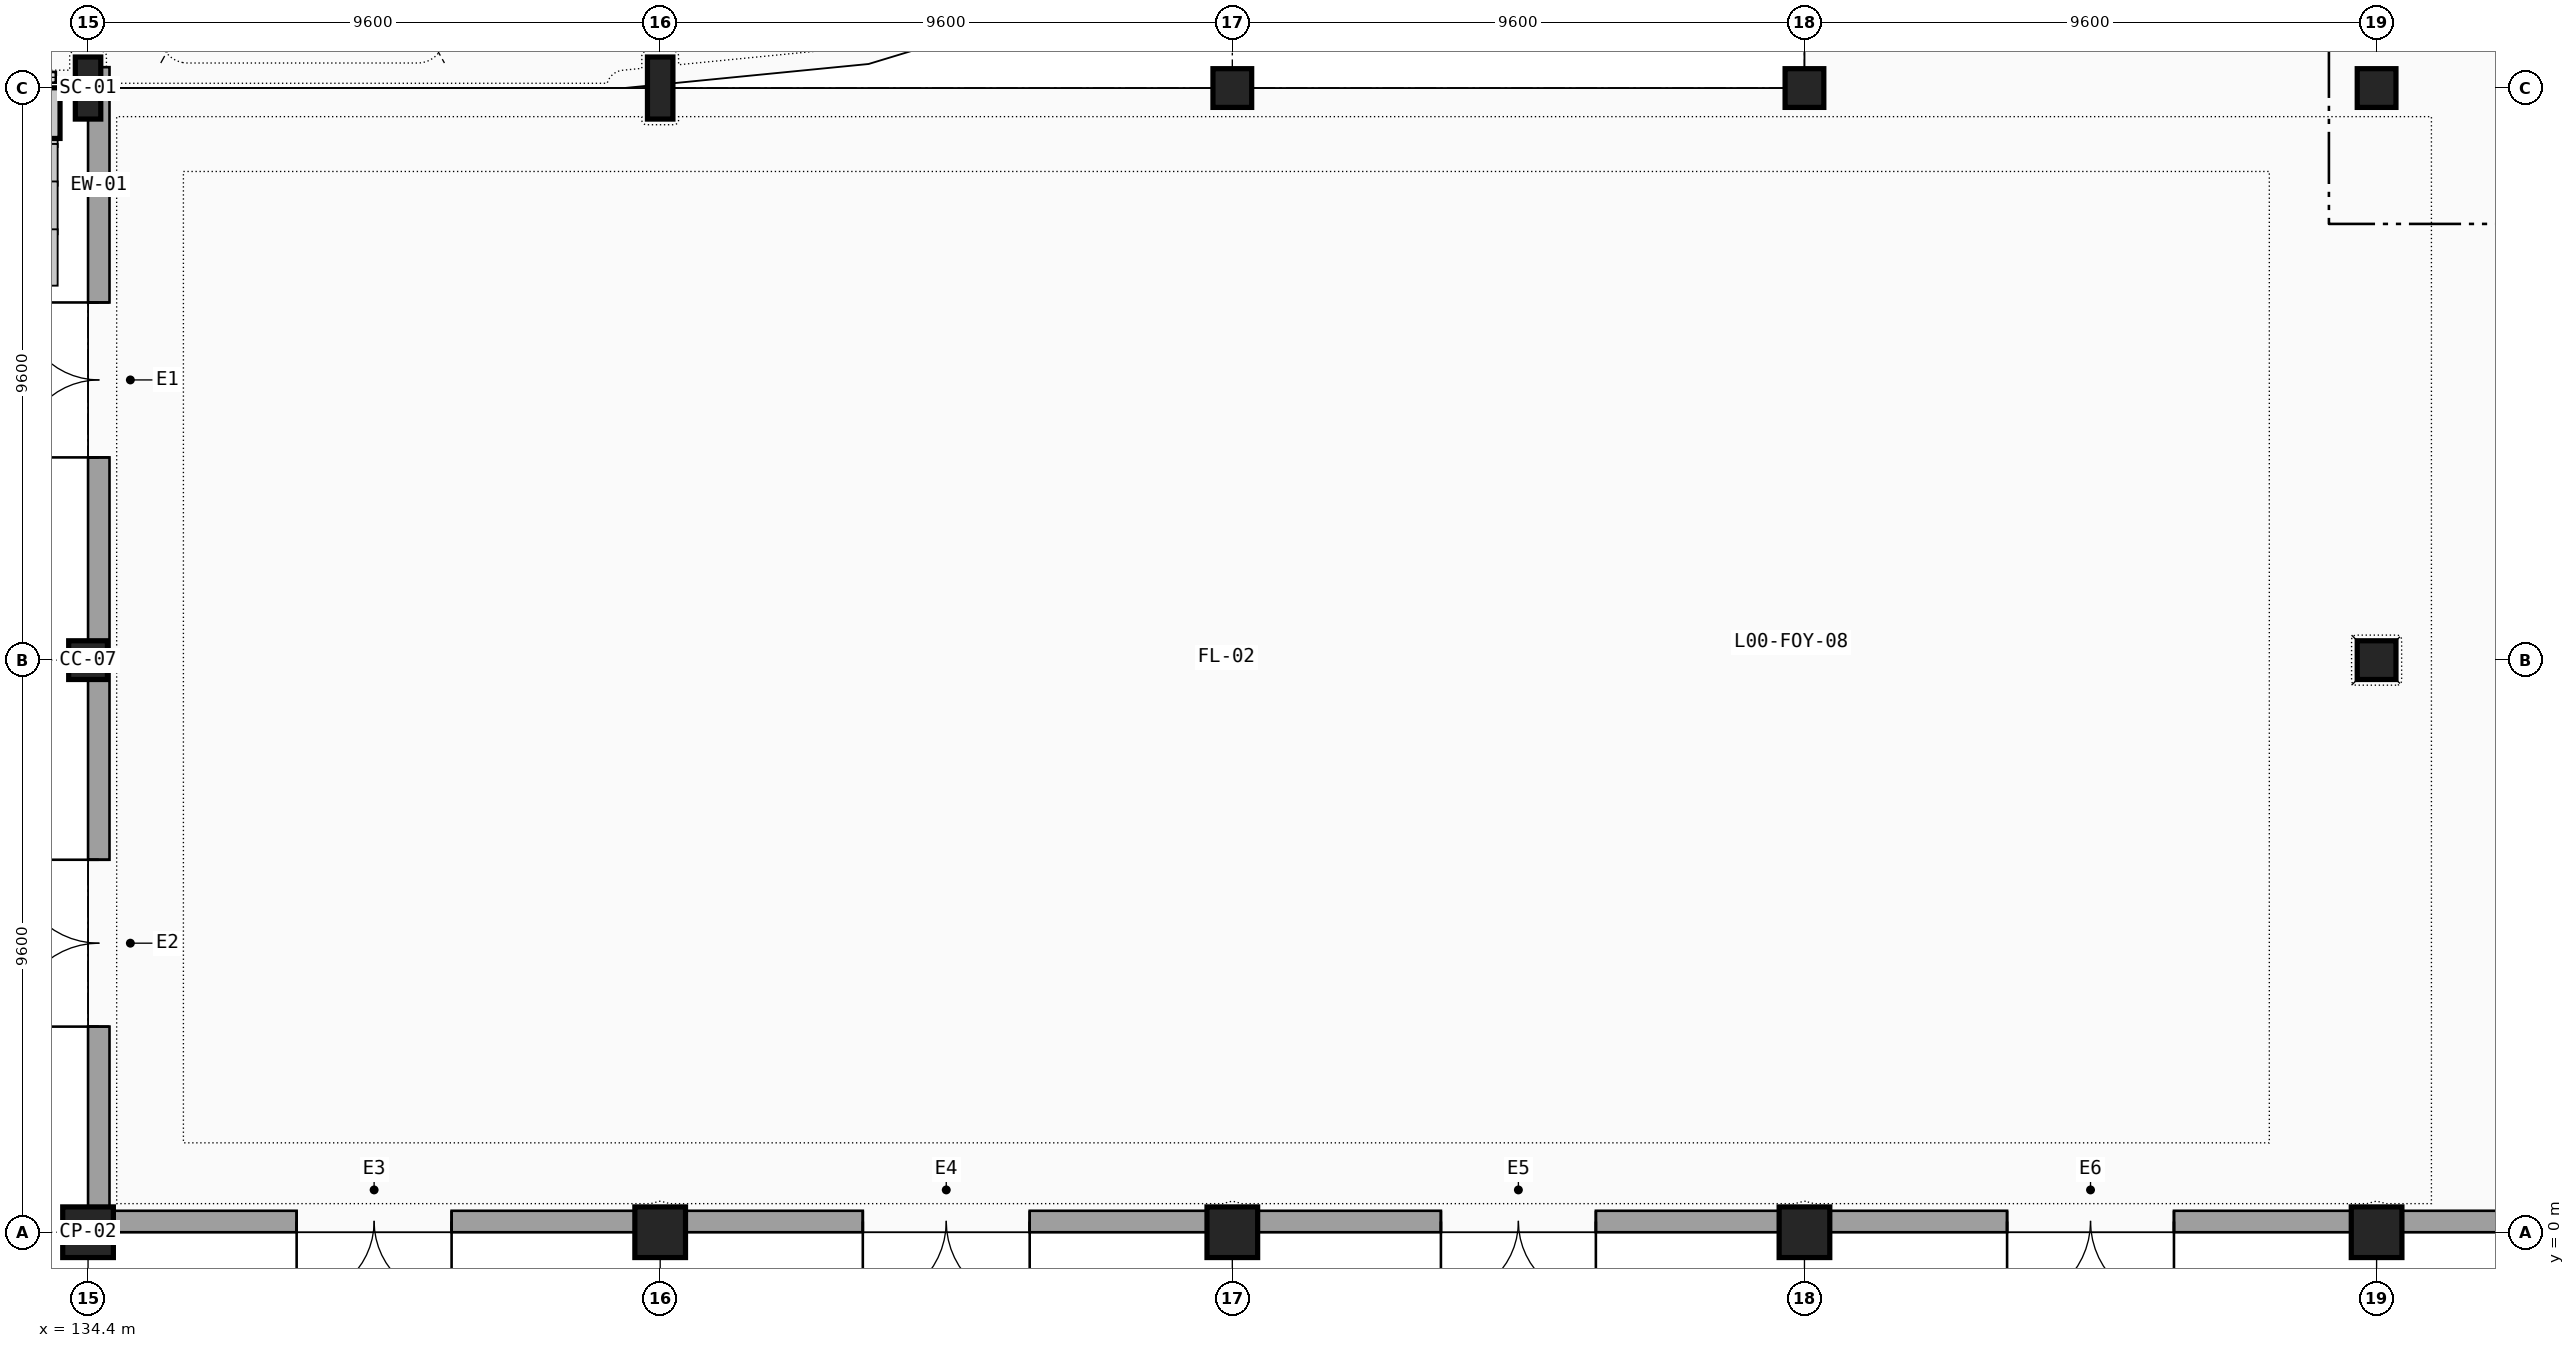
"""IFC4 building model, lengths in metres.
Left out: names, types, materials, properties, quantities, classifications, styles, units other than length and angle.
Written with IfcOpenShell. Run it as: python <this file> out.ifc"""

import sys

from ifc_helpers import new_model, si_unit, direction, frame, frame_2d, origin, origin_2d, place, context, subcontext, project, spatial, rectangle, circle, i_section, extrude, element, fill, save


model = new_model("IFC4")
c1 = context("Model", 3, precision=1e-05, world=origin(), true_north=direction((0.0, 1.0)))
c2 = subcontext(c1, "Body", "Model", "MODEL_VIEW")
j1 = project(units=[si_unit("LENGTHUNIT", "METRE"), si_unit("PLANEANGLEUNIT", "RADIAN")], contexts=[c1])
p1 = place(None, origin())
s1 = spatial("IfcSite", under=j1, at=p1, CompositionType="ELEMENT")
p2 = place(p1, origin())
s2 = spatial("IfcBuilding", under=s1, at=p2, CompositionType="ELEMENT")
p3 = place(p2, origin())
s3 = spatial("IfcBuildingStorey", under=s2, at=p3, CompositionType="ELEMENT", Elevation=0.0)
p4 = place(p3, frame((134.4, 0.0, 0.0), z_axis=(0.0, 0.0, 1.0), x_axis=(1.0, 0.0, 0.0)))
e1 = element("IfcColumn", 1, at=p4, inside=s3, PredefinedType="PILASTER", context=c2, shape_type="SweptSolid", body=[
    extrude(circle(Radius=0.425, at=origin_2d()), origin(), (0.0, 0.0, 1.0), 4.8),
])
p5 = place(p3, frame((134.4, 9.6, 0.0), z_axis=(0.0, 0.0, 1.0), x_axis=(1.0, 0.0, 0.0)))
e2 = element("IfcColumn", 2, at=p5, inside=s3, PredefinedType="COLUMN", context=c2, shape_type="SweptSolid", body=[
    extrude(rectangle(XDim=0.65, YDim=0.65, at=origin_2d()), origin(), (0.0, 0.0, 1.0), 4.8),
])
p6 = place(p3, frame((134.4, 19.2, 0.0), z_axis=(0.0, 0.0, 1.0), x_axis=(1.0, 0.0, 0.0)))
e3 = element("IfcColumn", 3, at=p6, inside=s3, PredefinedType="COLUMN", context=c2, shape_type="SweptSolid", body=[
    extrude(i_section(OverallWidth=0.427, OverallDepth=1.042, WebThickness=0.031, FlangeThickness=0.056, FilletRadius=0.031, at=origin_2d()), origin(), (0.0, 0.0, 1.0), 4.8),
])
p7 = place(p3, frame((144.0, 0.0, 0.0), z_axis=(0.0, 0.0, 1.0), x_axis=(1.0, 0.0, 0.0)))
e4 = element("IfcColumn", 4, at=p7, inside=s3, PredefinedType="PILASTER", context=c2, shape_type="SweptSolid", body=[
    extrude(circle(Radius=0.425, at=origin_2d()), origin(), (0.0, 0.0, 1.0), 4.8),
])
p8 = place(p3, frame((144.0, 19.2, 0.0), z_axis=(0.0, 0.0, 1.0), x_axis=(1.0, 0.0, 0.0)))
e5 = element("IfcColumn", 5, at=p8, inside=s3, PredefinedType="COLUMN", context=c2, shape_type="SweptSolid", body=[
    extrude(i_section(OverallWidth=0.427, OverallDepth=1.042, WebThickness=0.031, FlangeThickness=0.056, FilletRadius=0.031, at=origin_2d()), origin(), (0.0, 0.0, 1.0), 4.8),
])
p9 = place(p3, frame((153.6, 0.0, 0.0), z_axis=(0.0, 0.0, 1.0), x_axis=(1.0, 0.0, 0.0)))
e6 = element("IfcColumn", 6, at=p9, inside=s3, PredefinedType="PILASTER", context=c2, shape_type="SweptSolid", body=[
    extrude(circle(Radius=0.425, at=origin_2d()), origin(), (0.0, 0.0, 1.0), 4.8),
])
p10 = place(p3, frame((153.6, 19.2, 0.0), z_axis=(0.0, 0.0, 1.0), x_axis=(1.0, 0.0, 0.0)))
e7 = element("IfcColumn", 7, at=p10, inside=s3, PredefinedType="COLUMN", context=c2, shape_type="SweptSolid", body=[
    extrude(rectangle(XDim=0.65, YDim=0.65, at=origin_2d()), origin(), (0.0, 0.0, 1.0), 4.8),
])
p11 = place(p3, frame((163.2, 0.0, 0.0), z_axis=(0.0, 0.0, 1.0), x_axis=(1.0, 0.0, 0.0)))
e8 = element("IfcColumn", 8, at=p11, inside=s3, PredefinedType="PILASTER", context=c2, shape_type="SweptSolid", body=[
    extrude(circle(Radius=0.425, at=origin_2d()), origin(), (0.0, 0.0, 1.0), 4.8),
])
p12 = place(p3, frame((163.2, 19.2, 0.0), z_axis=(0.0, 0.0, 1.0), x_axis=(1.0, 0.0, 0.0)))
e9 = element("IfcColumn", 9, at=p12, inside=s3, PredefinedType="COLUMN", context=c2, shape_type="SweptSolid", body=[
    extrude(rectangle(XDim=0.65, YDim=0.65, at=origin_2d()), origin(), (0.0, 0.0, 1.0), 4.8),
])
p13 = place(p3, frame((172.8, 0.0, 0.0), z_axis=(0.0, 0.0, 1.0), x_axis=(1.0, 0.0, 0.0)))
e10 = element("IfcColumn", 10, at=p13, inside=s3, PredefinedType="PILASTER", context=c2, shape_type="SweptSolid", body=[
    extrude(circle(Radius=0.425, at=origin_2d()), origin(), (0.0, 0.0, 1.0), 4.8),
])
for number, where, z_axis, x_axis in (
    (11, (172.8, 9.6, 0.0), (0.0, 0.0, 1.0), (1.0, 0.0, 0.0)),
    (12, (172.8, 19.2, 0.0), (0.0, 0.0, 1.0), (1.0, 0.0, 0.0)),
):
    element("IfcColumn", number, at=place(p3, frame(where, z_axis=z_axis, x_axis=x_axis)), inside=s3, PredefinedType="COLUMN", context=c2, shape_type="SweptSolid", body=[
        extrude(rectangle(XDim=0.65, YDim=0.65, at=origin_2d()), origin(), (0.0, 0.0, 1.0), 4.8),
    ])
p14 = place(p3, frame((134.58, 19.55, 0.0), z_axis=(0.0, 0.0, 1.0), x_axis=(0.0, -1.0, 0.0)))
e13 = element("IfcWall", 13, at=p14, inside=s3, PredefinedType="SOLIDWALL", context=c2, shape_type="SweptSolid", body=[
    extrude(rectangle(XDim=9.95, YDim=0.36, at=frame_2d((4.975, 0.0))), origin(), (0.0, 0.0, 1.0), 3.573),
])
p15 = place(p14, frame((6.548, 0.0, 0.0), z_axis=(0.0, 0.0, 1.0), x_axis=(-1.0, 0.0, 0.0)))
e14 = element("IfcOpeningElement", 14, at=p15, cuts=e13, PredefinedType="OPENING", context=c2, shape_type="SweptSolid", body=[
    extrude(rectangle(XDim=2.6, YDim=2.6, at=frame_2d((1.3, 1.3))), frame((0.0, 0.19, 0.0), z_axis=(0.0, -1.0, 0.0), x_axis=(1.0, 0.0, 0.0)), (0.0, 0.0, 1.0), 0.38),
])
p16 = place(p3, frame((134.58, 9.6, 0.0), z_axis=(0.0, 0.0, 1.0), x_axis=(0.0, -1.0, 0.0)))
e15 = element("IfcWall", 15, at=p16, inside=s3, PredefinedType="SOLIDWALL", context=c2, shape_type="SweptSolid", body=[
    extrude(rectangle(XDim=9.195, YDim=0.36, at=frame_2d((4.598, 0.0))), origin(), (0.0, 0.0, 1.0), 3.7),
])
p17 = place(p16, frame((6.15, 0.0, 0.0), z_axis=(0.0, 0.0, 1.0), x_axis=(-1.0, 0.0, 0.0)))
e16 = element("IfcOpeningElement", 16, at=p17, cuts=e15, PredefinedType="OPENING", context=c2, shape_type="SweptSolid", body=[
    extrude(rectangle(XDim=2.8, YDim=2.6, at=frame_2d((1.4, 1.3))), frame((0.0, 0.19, 0.0), z_axis=(0.0, -1.0, 0.0), x_axis=(1.0, 0.0, 0.0)), (0.0, 0.0, 1.0), 0.38),
])
p18 = place(p3, frame((134.805, 0.18, 0.0), z_axis=(0.0, 0.0, 1.0), x_axis=(1.0, 0.0, 0.0)))
e17 = element("IfcWall", 17, at=p18, inside=s3, PredefinedType="SOLIDWALL", context=c2, shape_type="SweptSolid", body=[
    extrude(rectangle(XDim=8.79, YDim=0.36, at=frame_2d((4.395, 0.0))), origin(), (0.0, 0.0, 1.0), 3.573),
])
p19 = place(p18, frame((5.695, 0.0, 0.0), z_axis=(0.0, 0.0, 1.0), x_axis=(-1.0, 0.0, 0.0)))
e18 = element("IfcOpeningElement", 18, at=p19, cuts=e17, PredefinedType="OPENING", context=c2, shape_type="SweptSolid", body=[
    extrude(rectangle(XDim=2.6, YDim=2.6, at=frame_2d((1.3, 1.3))), frame((0.0, 0.19, 0.0), z_axis=(0.0, -1.0, 0.0), x_axis=(1.0, 0.0, 0.0)), (0.0, 0.0, 1.0), 0.38),
])
p20 = place(p3, frame((144.405, 0.18, 0.0), z_axis=(0.0, 0.0, 1.0), x_axis=(1.0, 0.0, 0.0)))
e19 = element("IfcWall", 19, at=p20, inside=s3, PredefinedType="SOLIDWALL", context=c2, shape_type="SweptSolid", body=[
    extrude(rectangle(XDim=8.79, YDim=0.36, at=frame_2d((4.395, 0.0))), origin(), (0.0, 0.0, 1.0), 3.573),
])
p21 = place(p20, frame((5.795, 0.0, 0.0), z_axis=(0.0, 0.0, 1.0), x_axis=(-1.0, 0.0, 0.0)))
e20 = element("IfcOpeningElement", 20, at=p21, cuts=e19, PredefinedType="OPENING", context=c2, shape_type="SweptSolid", body=[
    extrude(rectangle(XDim=2.8, YDim=2.6, at=frame_2d((1.4, 1.3))), frame((0.0, 0.19, 0.0), z_axis=(0.0, -1.0, 0.0), x_axis=(1.0, 0.0, 0.0)), (0.0, 0.0, 1.0), 0.38),
])
p22 = place(p3, frame((154.005, 0.18, 0.0), z_axis=(0.0, 0.0, 1.0), x_axis=(1.0, 0.0, 0.0)))
e21 = element("IfcWall", 21, at=p22, inside=s3, PredefinedType="SOLIDWALL", context=c2, shape_type="SweptSolid", body=[
    extrude(rectangle(XDim=8.79, YDim=0.36, at=frame_2d((4.395, 0.0))), origin(), (0.0, 0.0, 1.0), 3.573),
])
p23 = place(p22, frame((5.695, 0.0, 0.0), z_axis=(0.0, 0.0, 1.0), x_axis=(-1.0, 0.0, 0.0)))
e22 = element("IfcOpeningElement", 22, at=p23, cuts=e21, PredefinedType="OPENING", context=c2, shape_type="SweptSolid", body=[
    extrude(rectangle(XDim=2.6, YDim=2.6, at=frame_2d((1.3, 1.3))), frame((0.0, 0.19, 0.0), z_axis=(0.0, -1.0, 0.0), x_axis=(1.0, 0.0, 0.0)), (0.0, 0.0, 1.0), 0.38),
])
p24 = place(p3, frame((163.605, 0.18, 0.0), z_axis=(0.0, 0.0, 1.0), x_axis=(1.0, 0.0, 0.0)))
e23 = element("IfcWall", 23, at=p24, inside=s3, PredefinedType="SOLIDWALL", context=c2, shape_type="SweptSolid", body=[
    extrude(rectangle(XDim=8.79, YDim=0.36, at=frame_2d((4.395, 0.0))), origin(), (0.0, 0.0, 1.0), 3.573),
])
p25 = place(p24, frame((5.795, 0.0, 0.0), z_axis=(0.0, 0.0, 1.0), x_axis=(-1.0, 0.0, 0.0)))
e24 = element("IfcOpeningElement", 24, at=p25, cuts=e23, PredefinedType="OPENING", context=c2, shape_type="SweptSolid", body=[
    extrude(rectangle(XDim=2.8, YDim=2.6, at=frame_2d((1.4, 1.3))), frame((0.0, 0.19, 0.0), z_axis=(0.0, -1.0, 0.0), x_axis=(1.0, 0.0, 0.0)), (0.0, 0.0, 1.0), 0.38),
])
p26 = place(p3, frame((173.205, 0.18, 0.0), z_axis=(0.0, 0.0, 1.0), x_axis=(1.0, 0.0, 0.0)))
e25 = element("IfcWall", 25, at=p26, inside=s3, PredefinedType="SOLIDWALL", context=c2, shape_type="SweptSolid", body=[
    extrude(rectangle(XDim=8.79, YDim=0.36, at=frame_2d((4.395, 0.0))), origin(), (0.0, 0.0, 1.0), 3.75),
])
p27 = place(p26, frame((5.695, 0.0, 0.0), z_axis=(0.0, 0.0, 1.0), x_axis=(-1.0, 0.0, 0.0)))
e26 = element("IfcOpeningElement", 26, at=p27, cuts=e25, PredefinedType="OPENING", context=c2, shape_type="SweptSolid", body=[
    extrude(rectangle(XDim=2.6, YDim=2.6, at=frame_2d((1.3, 1.3))), frame((0.0, 0.19, 0.0), z_axis=(0.0, -1.0, 0.0), x_axis=(1.0, 0.0, 0.0)), (0.0, 0.0, 1.0), 0.38),
])
p28 = place(p15, origin())
e27 = element("IfcDoor", 27, at=p28, inside=s3, OperationType="DOUBLE_DOOR_SINGLE_SWING", PredefinedType="DOOR", context=c2, shape_type="SweptSolid", body=[
    extrude(rectangle(XDim=2.6, YDim=2.6, at=frame_2d((1.3, 1.3))), frame((0.0, 0.025, 0.0), z_axis=(0.0, -1.0, 0.0), x_axis=(1.0, 0.0, 0.0)), (0.0, 0.0, 1.0), 0.05),
])
fill(e14, e27)
p29 = place(p17, origin())
e28 = element("IfcDoor", 28, at=p29, inside=s3, OperationType="DOUBLE_DOOR_SINGLE_SWING", PredefinedType="DOOR", context=c2, shape_type="SweptSolid", body=[
    extrude(rectangle(XDim=2.8, YDim=2.6, at=frame_2d((1.4, 1.3))), frame((0.0, 0.025, 0.0), z_axis=(0.0, -1.0, 0.0), x_axis=(1.0, 0.0, 0.0)), (0.0, 0.0, 1.0), 0.05),
])
fill(e16, e28)
p30 = place(p19, origin())
e29 = element("IfcDoor", 29, at=p30, inside=s3, OperationType="DOUBLE_DOOR_SINGLE_SWING", PredefinedType="DOOR", context=c2, shape_type="SweptSolid", body=[
    extrude(rectangle(XDim=2.6, YDim=2.6, at=frame_2d((1.3, 1.3))), frame((0.0, 0.025, 0.0), z_axis=(0.0, -1.0, 0.0), x_axis=(1.0, 0.0, 0.0)), (0.0, 0.0, 1.0), 0.05),
])
fill(e18, e29)
p31 = place(p21, origin())
e30 = element("IfcDoor", 30, at=p31, inside=s3, OperationType="DOUBLE_DOOR_SINGLE_SWING", PredefinedType="DOOR", context=c2, shape_type="SweptSolid", body=[
    extrude(rectangle(XDim=2.8, YDim=2.6, at=frame_2d((1.4, 1.3))), frame((0.0, 0.025, 0.0), z_axis=(0.0, -1.0, 0.0), x_axis=(1.0, 0.0, 0.0)), (0.0, 0.0, 1.0), 0.05),
])
fill(e20, e30)
p32 = place(p23, origin())
e31 = element("IfcDoor", 31, at=p32, inside=s3, OperationType="DOUBLE_DOOR_SINGLE_SWING", PredefinedType="DOOR", context=c2, shape_type="SweptSolid", body=[
    extrude(rectangle(XDim=2.6, YDim=2.6, at=frame_2d((1.3, 1.3))), frame((0.0, 0.025, 0.0), z_axis=(0.0, -1.0, 0.0), x_axis=(1.0, 0.0, 0.0)), (0.0, 0.0, 1.0), 0.05),
])
fill(e22, e31)
p33 = place(p25, origin())
e32 = element("IfcDoor", 32, at=p33, inside=s3, OperationType="DOUBLE_DOOR_SINGLE_SWING", PredefinedType="DOOR", context=c2, shape_type="SweptSolid", body=[
    extrude(rectangle(XDim=2.8, YDim=2.6, at=frame_2d((1.4, 1.3))), frame((0.0, 0.025, 0.0), z_axis=(0.0, -1.0, 0.0), x_axis=(1.0, 0.0, 0.0)), (0.0, 0.0, 1.0), 0.05),
])
fill(e24, e32)
save(model, sys.argv[1])
